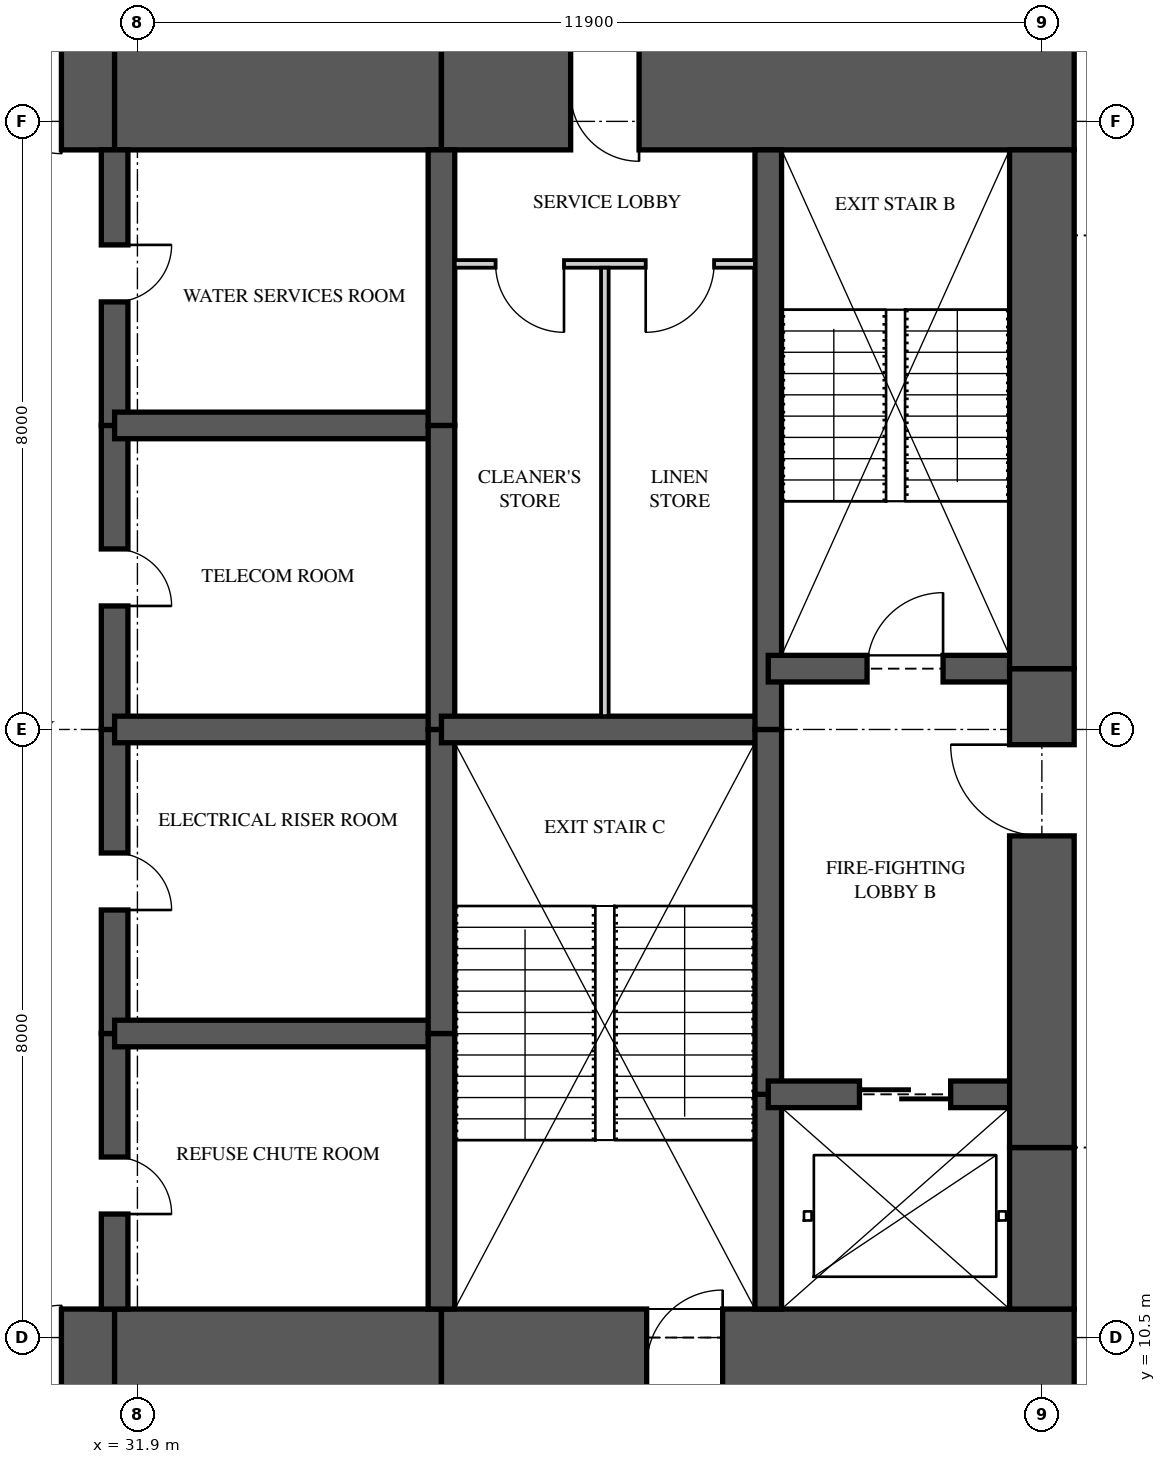
"""IFC4 building model, lengths in metres.
Left out: names, types, materials, properties, quantities, classifications, styles, units other than length and angle.
Written with IfcOpenShell. Run it as: python <this file> out.ifc"""

import sys

from ifc_helpers import new_model, si_unit, direction, frame, frame_2d, origin, place, context, subcontext, project, spatial, rectangle, extrude, element, fill, save


model = new_model("IFC4")
c1 = context("Model", 3, precision=1e-05, world=origin(), true_north=direction((0.0, 1.0)))
c2 = subcontext(c1, "Body", "Model", "MODEL_VIEW")
j1 = project(units=[si_unit("LENGTHUNIT", "METRE"), si_unit("PLANEANGLEUNIT", "RADIAN")], contexts=[c1])
p1 = place(None, origin())
s1 = spatial("IfcSite", under=j1, at=p1, CompositionType="ELEMENT")
p2 = place(p1, origin())
s2 = spatial("IfcBuilding", under=s1, at=p2, CompositionType="ELEMENT")
p3 = place(p2, frame((0.0, 0.0, 131.65)))
s3 = spatial("IfcBuildingStorey", under=s2, at=p3, CompositionType="ELEMENT", Elevation=131.65)
p4 = place(p3, frame((26.0, 10.125, 0.0), z_axis=(0.0, 0.0, 1.0), x_axis=(1.0, 0.0, 0.0)))
e1 = element("IfcWall", 1, at=p4, inside=s3, PredefinedType="SHEAR", context=c2, shape_type="SweptSolid", body=[
    extrude(rectangle(XDim=5.6, YDim=1.5, at=frame_2d((2.8, 0.0))), origin(), (0.0, 0.0, 1.0), 3.35),
])
p5 = place(p4, frame((3.3, 0.0, 0.0)))
e2 = element("IfcOpeningElement", 2, at=p5, cuts=e1, PredefinedType="OPENING", context=c2, shape_type="SweptSolid", body=[
    extrude(rectangle(XDim=1.6, YDim=2.1, at=frame_2d((0.8, 1.05))), frame((0.0, 0.76, 0.0), z_axis=(0.0, -1.0, 0.0), x_axis=(1.0, 0.0, 0.0)), (0.0, 0.0, 1.0), 1.52),
])
p6 = place(p3, frame((31.6, 10.125, 0.0), z_axis=(0.0, 0.0, 1.0), x_axis=(1.0, 0.0, 0.0)))
e3 = element("IfcWall", 3, at=p6, inside=s3, PredefinedType="SHEAR", context=c2, shape_type="SweptSolid", body=[
    extrude(rectangle(XDim=4.3, YDim=1.5, at=frame_2d((2.15, 0.0))), origin(), (0.0, 0.0, 1.0), 3.35),
])
p7 = place(p3, frame((35.9, 10.125, 0.0), z_axis=(0.0, 0.0, 1.0), x_axis=(1.0, 0.0, 0.0)))
e4 = element("IfcWall", 4, at=p7, inside=s3, PredefinedType="SHEAR", context=c2, shape_type="SweptSolid", body=[
    extrude(rectangle(XDim=8.325, YDim=1.5, at=frame_2d((4.163, 0.0))), origin(), (0.0, 0.0, 1.0), 3.35),
])
p8 = place(p7, frame((2.7, 0.0, 0.0)))
e5 = element("IfcOpeningElement", 5, at=p8, cuts=e4, PredefinedType="OPENING", context=c2, shape_type="SweptSolid", body=[
    extrude(rectangle(XDim=1.0, YDim=2.1, at=frame_2d((0.5, 1.05))), frame((0.0, 0.76, 0.0), z_axis=(0.0, -1.0, 0.0), x_axis=(1.0, 0.0, 0.0)), (0.0, 0.0, 1.0), 1.52),
])
p9 = place(p3, frame((44.225, 26.875, 0.0), z_axis=(0.0, 0.0, 1.0), x_axis=(-1.0, 0.0, 0.0)))
e6 = element("IfcWall", 6, at=p9, inside=s3, PredefinedType="SHEAR", context=c2, shape_type="SweptSolid", body=[
    extrude(rectangle(XDim=8.325, YDim=1.5, at=frame_2d((4.163, 0.0))), origin(), (0.0, 0.0, 1.0), 3.35),
])
p10 = place(p9, frame((5.725, 0.0, 0.0)))
e7 = element("IfcOpeningElement", 7, at=p10, cuts=e6, PredefinedType="OPENING", context=c2, shape_type="SweptSolid", body=[
    extrude(rectangle(XDim=0.9, YDim=2.1, at=frame_2d((0.45, 1.05))), frame((0.0, 0.76, 0.0), z_axis=(0.0, -1.0, 0.0), x_axis=(1.0, 0.0, 0.0)), (0.0, 0.0, 1.0), 1.52),
])
p11 = place(p3, frame((35.9, 26.875, 0.0), z_axis=(0.0, 0.0, 1.0), x_axis=(-1.0, 0.0, 0.0)))
e8 = element("IfcWall", 8, at=p11, inside=s3, PredefinedType="SHEAR", context=c2, shape_type="SweptSolid", body=[
    extrude(rectangle(XDim=4.3, YDim=1.5, at=frame_2d((2.15, 0.0))), origin(), (0.0, 0.0, 1.0), 3.35),
])
p12 = place(p3, frame((31.6, 26.875, 0.0), z_axis=(0.0, 0.0, 1.0), x_axis=(-1.0, 0.0, 0.0)))
e9 = element("IfcWall", 9, at=p12, inside=s3, PredefinedType="SHEAR", context=c2, shape_type="SweptSolid", body=[
    extrude(rectangle(XDim=5.6, YDim=1.5, at=frame_2d((2.8, 0.0))), origin(), (0.0, 0.0, 1.0), 3.35),
])
p13 = place(p12, frame((0.7, 0.0, 0.0)))
e10 = element("IfcOpeningElement", 10, at=p13, cuts=e9, PredefinedType="OPENING", context=c2, shape_type="SweptSolid", body=[
    extrude(rectangle(XDim=1.6, YDim=2.1, at=frame_2d((0.8, 1.05))), frame((0.0, 0.76, 0.0), z_axis=(0.0, -1.0, 0.0), x_axis=(1.0, 0.0, 0.0)), (0.0, 0.0, 1.0), 1.52),
])
p14 = place(p3, frame((43.8, 10.875, 0.0), z_axis=(0.0, 0.0, 1.0), x_axis=(0.0, 1.0, 0.0)))
e11 = element("IfcWall", 11, at=p14, inside=s3, PredefinedType="SHEAR", context=c2, shape_type="SweptSolid", body=[
    extrude(rectangle(XDim=2.125, YDim=0.85, at=frame_2d((1.062, 0.0))), origin(), (0.0, 0.0, 1.0), 3.35),
])
p15 = place(p3, frame((43.8, 13.0, 0.0), z_axis=(0.0, 0.0, 1.0), x_axis=(0.0, 1.0, 0.0)))
e12 = element("IfcWall", 12, at=p15, inside=s3, PredefinedType="SHEAR", context=c2, shape_type="SweptSolid", body=[
    extrude(rectangle(XDim=6.3, YDim=0.85, at=frame_2d((3.15, 0.0))), origin(), (0.0, 0.0, 1.0), 3.35),
])
p16 = place(p15, frame((4.1, 0.0, 0.0)))
e13 = element("IfcOpeningElement", 13, at=p16, cuts=e12, PredefinedType="OPENING", context=c2, shape_type="SweptSolid", body=[
    extrude(rectangle(XDim=1.2, YDim=2.2, at=frame_2d((0.6, 1.1))), frame((0.0, 0.435, 0.0), z_axis=(0.0, -1.0, 0.0), x_axis=(1.0, 0.0, 0.0)), (0.0, 0.0, 1.0), 0.87),
])
p17 = place(p3, frame((43.8, 19.3, 0.0), z_axis=(0.0, 0.0, 1.0), x_axis=(0.0, 1.0, 0.0)))
e14 = element("IfcWall", 14, at=p17, inside=s3, PredefinedType="SHEAR", context=c2, shape_type="SweptSolid", body=[
    extrude(rectangle(XDim=6.825, YDim=0.85, at=frame_2d((3.413, 0.0))), origin(), (0.0, 0.0, 1.0), 3.35),
])
p18 = place(p3, frame((31.6, 10.875, 0.0), z_axis=(0.0, 0.0, 1.0), x_axis=(0.0, 1.0, 0.0)))
e15 = element("IfcWall", 15, at=p18, inside=s3, PredefinedType="SHEAR", context=c2, shape_type="SweptSolid", body=[
    extrude(rectangle(XDim=3.625, YDim=0.35, at=frame_2d((1.812, 0.0))), origin(), (0.0, 0.0, 1.0), 3.35),
])
p19 = place(p18, frame((1.25, 0.0, 0.0)))
e16 = element("IfcOpeningElement", 16, at=p19, cuts=e15, PredefinedType="OPENING", context=c2, shape_type="SweptSolid", body=[
    extrude(rectangle(XDim=0.75, YDim=2.1, at=frame_2d((0.375, 1.05))), frame((0.0, 0.185, 0.0), z_axis=(0.0, -1.0, 0.0), x_axis=(1.0, 0.0, 0.0)), (0.0, 0.0, 1.0), 0.37),
])
p20 = place(p3, frame((31.6, 14.5, 0.0), z_axis=(0.0, 0.0, 1.0), x_axis=(0.0, 1.0, 0.0)))
e17 = element("IfcWall", 17, at=p20, inside=s3, PredefinedType="SHEAR", context=c2, shape_type="SweptSolid", body=[
    extrude(rectangle(XDim=4.0, YDim=0.35, at=frame_2d((2.0, 0.0))), origin(), (0.0, 0.0, 1.0), 3.35),
])
p21 = place(p20, frame((1.625, 0.0, 0.0)))
e18 = element("IfcOpeningElement", 18, at=p21, cuts=e17, PredefinedType="OPENING", context=c2, shape_type="SweptSolid", body=[
    extrude(rectangle(XDim=0.75, YDim=2.1, at=frame_2d((0.375, 1.05))), frame((0.0, 0.185, 0.0), z_axis=(0.0, -1.0, 0.0), x_axis=(1.0, 0.0, 0.0)), (0.0, 0.0, 1.0), 0.37),
])
p22 = place(p3, frame((31.6, 18.5, 0.0), z_axis=(0.0, 0.0, 1.0), x_axis=(0.0, 1.0, 0.0)))
e19 = element("IfcWall", 19, at=p22, inside=s3, PredefinedType="SHEAR", context=c2, shape_type="SweptSolid", body=[
    extrude(rectangle(XDim=4.0, YDim=0.35, at=frame_2d((2.0, 0.0))), origin(), (0.0, 0.0, 1.0), 3.35),
])
p23 = place(p22, frame((1.625, 0.0, 0.0)))
e20 = element("IfcOpeningElement", 20, at=p23, cuts=e19, PredefinedType="OPENING", context=c2, shape_type="SweptSolid", body=[
    extrude(rectangle(XDim=0.75, YDim=2.1, at=frame_2d((0.375, 1.05))), frame((0.0, 0.185, 0.0), z_axis=(0.0, -1.0, 0.0), x_axis=(1.0, 0.0, 0.0)), (0.0, 0.0, 1.0), 0.37),
])
p24 = place(p3, frame((31.6, 22.5, 0.0), z_axis=(0.0, 0.0, 1.0), x_axis=(0.0, 1.0, 0.0)))
e21 = element("IfcWall", 21, at=p24, inside=s3, PredefinedType="SHEAR", context=c2, shape_type="SweptSolid", body=[
    extrude(rectangle(XDim=3.625, YDim=0.35, at=frame_2d((1.812, 0.0))), origin(), (0.0, 0.0, 1.0), 3.35),
])
p25 = place(p24, frame((1.625, 0.0, 0.0)))
e22 = element("IfcOpeningElement", 22, at=p25, cuts=e21, PredefinedType="OPENING", context=c2, shape_type="SweptSolid", body=[
    extrude(rectangle(XDim=0.75, YDim=2.1, at=frame_2d((0.375, 1.05))), frame((0.0, 0.185, 0.0), z_axis=(0.0, -1.0, 0.0), x_axis=(1.0, 0.0, 0.0)), (0.0, 0.0, 1.0), 0.37),
])
p26 = place(p3, frame((35.9, 10.875, 0.0), z_axis=(0.0, 0.0, 1.0), x_axis=(0.0, 1.0, 0.0)))
e23 = element("IfcWall", 23, at=p26, inside=s3, PredefinedType="SHEAR", context=c2, shape_type="SweptSolid", body=[
    extrude(rectangle(XDim=3.625, YDim=0.35, at=frame_2d((1.812, 0.0))), origin(), (0.0, 0.0, 1.0), 3.35),
])
for number, where, z_axis, x_axis in (
    (24, (35.9, 14.5, 0.0), (0.0, 0.0, 1.0), (0.0, 1.0, 0.0)),
    (25, (35.9, 18.5, 0.0), (0.0, 0.0, 1.0), (0.0, 1.0, 0.0)),
):
    element("IfcWall", number, at=place(p3, frame(where, z_axis=z_axis, x_axis=x_axis)), inside=s3, PredefinedType="SHEAR", context=c2, shape_type="SweptSolid", body=[
        extrude(rectangle(XDim=4.0, YDim=0.35, at=frame_2d((2.0, 0.0))), origin(), (0.0, 0.0, 1.0), 3.35),
    ])
p27 = place(p3, frame((35.9, 22.5, 0.0), z_axis=(0.0, 0.0, 1.0), x_axis=(0.0, 1.0, 0.0)))
e26 = element("IfcWall", 26, at=p27, inside=s3, PredefinedType="SHEAR", context=c2, shape_type="SweptSolid", body=[
    extrude(rectangle(XDim=3.625, YDim=0.35, at=frame_2d((1.812, 0.0))), origin(), (0.0, 0.0, 1.0), 3.35),
])
p28 = place(p3, frame((40.2, 10.875, 0.0), z_axis=(0.0, 0.0, 1.0), x_axis=(0.0, 1.0, 0.0)))
e27 = element("IfcWall", 27, at=p28, inside=s3, PredefinedType="SHEAR", context=c2, shape_type="SweptSolid", body=[
    extrude(rectangle(XDim=2.825, YDim=0.35, at=frame_2d((1.413, 0.0))), origin(), (0.0, 0.0, 1.0), 3.35),
])
p29 = place(p3, frame((40.2, 13.7, 0.0), z_axis=(0.0, 0.0, 1.0), x_axis=(0.0, 1.0, 0.0)))
e28 = element("IfcWall", 28, at=p29, inside=s3, PredefinedType="SHEAR", context=c2, shape_type="SweptSolid", body=[
    extrude(rectangle(XDim=4.8, YDim=0.35, at=frame_2d((2.4, 0.0))), origin(), (0.0, 0.0, 1.0), 3.35),
])
p30 = place(p3, frame((40.2, 18.5, 0.0), z_axis=(0.0, 0.0, 1.0), x_axis=(0.0, 1.0, 0.0)))
e29 = element("IfcWall", 29, at=p30, inside=s3, PredefinedType="SHEAR", context=c2, shape_type="SweptSolid", body=[
    extrude(rectangle(XDim=7.625, YDim=0.35, at=frame_2d((3.812, 0.0))), origin(), (0.0, 0.0, 1.0), 3.35),
])
for number, where, z_axis, x_axis in (
    (30, (31.6, 14.5, 0.0), (0.0, 0.0, 1.0), (1.0, 0.0, 0.0)),
    (31, (31.6, 18.5, 0.0), (0.0, 0.0, 1.0), (1.0, 0.0, 0.0)),
    (32, (31.6, 22.5, 0.0), (0.0, 0.0, 1.0), (1.0, 0.0, 0.0)),
):
    element("IfcWall", number, at=place(p3, frame(where, z_axis=z_axis, x_axis=x_axis)), inside=s3, PredefinedType="SHEAR", context=c2, shape_type="SweptSolid", body=[
        extrude(rectangle(XDim=4.3, YDim=0.35, at=frame_2d((2.15, 0.0))), origin(), (0.0, 0.0, 1.0), 3.35),
    ])
p31 = place(p3, frame((35.9, 18.5, 0.0), z_axis=(0.0, 0.0, 1.0), x_axis=(1.0, 0.0, 0.0)))
e33 = element("IfcWall", 33, at=p31, inside=s3, PredefinedType="SHEAR", context=c2, shape_type="SweptSolid", body=[
    extrude(rectangle(XDim=4.3, YDim=0.35, at=frame_2d((2.15, 0.0))), origin(), (0.0, 0.0, 1.0), 3.35),
])
p32 = place(p3, frame((40.2, 13.7, 0.0), z_axis=(0.0, 0.0, 1.0), x_axis=(1.0, 0.0, 0.0)))
e34 = element("IfcWall", 34, at=p32, inside=s3, PredefinedType="SHEAR", context=c2, shape_type="SweptSolid", body=[
    extrude(rectangle(XDim=3.6, YDim=0.35, at=frame_2d((1.8, 0.0))), origin(), (0.0, 0.0, 1.0), 3.35),
])
p33 = place(p32, frame((1.2, 0.0, 0.0)))
e35 = element("IfcOpeningElement", 35, at=p33, cuts=e34, PredefinedType="OPENING", context=c2, shape_type="SweptSolid", body=[
    extrude(rectangle(XDim=1.2, YDim=2.1, at=frame_2d((0.6, 1.05))), frame((0.0, 0.185, 0.0), z_axis=(0.0, -1.0, 0.0), x_axis=(1.0, 0.0, 0.0)), (0.0, 0.0, 1.0), 0.37),
])
p34 = place(p3, frame((40.2, 19.3, 0.0), z_axis=(0.0, 0.0, 1.0), x_axis=(1.0, 0.0, 0.0)))
e36 = element("IfcWall", 36, at=p34, inside=s3, PredefinedType="SHEAR", context=c2, shape_type="SweptSolid", body=[
    extrude(rectangle(XDim=3.6, YDim=0.35, at=frame_2d((1.8, 0.0))), origin(), (0.0, 0.0, 1.0), 3.35),
])
p35 = place(p34, frame((1.3, 0.0, 0.0)))
e37 = element("IfcOpeningElement", 37, at=p35, cuts=e36, PredefinedType="OPENING", context=c2, shape_type="SweptSolid", body=[
    extrude(rectangle(XDim=1.0, YDim=2.1, at=frame_2d((0.5, 1.05))), frame((0.0, 0.185, 0.0), z_axis=(0.0, -1.0, 0.0), x_axis=(1.0, 0.0, 0.0)), (0.0, 0.0, 1.0), 0.37),
])
p36 = place(p3, frame((36.075, 24.625, 0.0), z_axis=(0.0, 0.0, 1.0), x_axis=(1.0, 0.0, 0.0)))
e38 = element("IfcWall", 38, at=p36, inside=s3, PredefinedType="PARTITIONING", context=c2, shape_type="SweptSolid", body=[
    extrude(rectangle(XDim=3.95, YDim=0.1, at=frame_2d((1.975, 0.0))), origin(), (0.0, 0.0, 1.0), 3.11),
])
p37 = place(p36, frame((0.538, 0.0, 0.0)))
e39 = element("IfcOpeningElement", 39, at=p37, cuts=e38, PredefinedType="OPENING", context=c2, shape_type="SweptSolid", body=[
    extrude(rectangle(XDim=0.9, YDim=2.1, at=frame_2d((0.45, 1.05))), frame((0.0, 0.06, 0.0), z_axis=(0.0, -1.0, 0.0), x_axis=(1.0, 0.0, 0.0)), (0.0, 0.0, 1.0), 0.12),
])
p38 = place(p36, frame((2.512, 0.0, 0.0)))
e40 = element("IfcOpeningElement", 40, at=p38, cuts=e38, PredefinedType="OPENING", context=c2, shape_type="SweptSolid", body=[
    extrude(rectangle(XDim=0.9, YDim=2.1, at=frame_2d((0.45, 1.05))), frame((0.0, 0.06, 0.0), z_axis=(0.0, -1.0, 0.0), x_axis=(1.0, 0.0, 0.0)), (0.0, 0.0, 1.0), 0.12),
])
p39 = place(p3, frame((38.05, 18.675, 0.0), z_axis=(0.0, 0.0, 1.0), x_axis=(0.0, 1.0, 0.0)))
e41 = element("IfcWall", 41, at=p39, inside=s3, PredefinedType="PARTITIONING", context=c2, shape_type="SweptSolid", body=[
    extrude(rectangle(XDim=5.9, YDim=0.1, at=frame_2d((2.95, 0.0))), origin(), (0.0, 0.0, 1.0), 3.11),
])
p40 = place(p37, frame((0.9, 0.0, 0.0), z_axis=(0.0, 0.0, 1.0), x_axis=(-1.0, 0.0, 0.0)))
e42 = element("IfcDoor", 42, at=p40, inside=s3, OperationType="SINGLE_SWING_LEFT", PredefinedType="DOOR", context=c2, shape_type="SweptSolid", body=[
    extrude(rectangle(XDim=0.9, YDim=2.1, at=frame_2d((0.45, 1.05))), frame((0.0, 0.025, 0.0), z_axis=(0.0, -1.0, 0.0), x_axis=(1.0, 0.0, 0.0)), (0.0, 0.0, 1.0), 0.05),
])
fill(e39, e42)
p41 = place(p38, frame((0.9, 0.0, 0.0), z_axis=(0.0, 0.0, 1.0), x_axis=(-1.0, 0.0, 0.0)))
e43 = element("IfcDoor", 43, at=p41, inside=s3, OperationType="SINGLE_SWING_RIGHT", PredefinedType="DOOR", context=c2, shape_type="SweptSolid", body=[
    extrude(rectangle(XDim=0.9, YDim=2.1, at=frame_2d((0.45, 1.05))), frame((0.0, 0.025, 0.0), z_axis=(0.0, -1.0, 0.0), x_axis=(1.0, 0.0, 0.0)), (0.0, 0.0, 1.0), 0.05),
])
fill(e40, e43)
p42 = place(p35, origin())
e44 = element("IfcDoor", 44, at=p42, inside=s3, OperationType="SINGLE_SWING_RIGHT", PredefinedType="DOOR", context=c2, shape_type="SweptSolid", body=[
    extrude(rectangle(XDim=1.0, YDim=2.1, at=frame_2d((0.5, 1.05))), frame((0.0, 0.025, 0.0), z_axis=(0.0, -1.0, 0.0), x_axis=(1.0, 0.0, 0.0)), (0.0, 0.0, 1.0), 0.05),
])
fill(e37, e44)
p43 = place(p16, origin())
e45 = element("IfcDoor", 45, at=p43, inside=s3, OperationType="SINGLE_SWING_RIGHT", PredefinedType="DOOR", context=c2, shape_type="SweptSolid", body=[
    extrude(rectangle(XDim=1.2, YDim=2.2, at=frame_2d((0.6, 1.1))), frame((0.0, 0.025, 0.0), z_axis=(0.0, -1.0, 0.0), x_axis=(1.0, 0.0, 0.0)), (0.0, 0.0, 1.0), 0.05),
])
fill(e13, e45)
p44 = place(p33, origin())
e46 = element("IfcDoor", 46, at=p44, inside=s3, OperationType="SLIDING_TO_LEFT", PredefinedType="DOOR", context=c2, shape_type="SweptSolid", body=[
    extrude(rectangle(XDim=1.2, YDim=2.1, at=frame_2d((0.6, 1.05))), frame((0.0, 0.025, 0.0), z_axis=(0.0, -1.0, 0.0), x_axis=(1.0, 0.0, 0.0)), (0.0, 0.0, 1.0), 0.05),
])
fill(e35, e46)
p45 = place(p5, origin())
e47 = element("IfcDoor", 47, at=p45, inside=s3, OperationType="DOUBLE_DOOR_SINGLE_SWING", PredefinedType="DOOR", context=c2, shape_type="SweptSolid", body=[
    extrude(rectangle(XDim=1.6, YDim=2.1, at=frame_2d((0.8, 1.05))), frame((0.0, 0.025, 0.0), z_axis=(0.0, -1.0, 0.0), x_axis=(1.0, 0.0, 0.0)), (0.0, 0.0, 1.0), 0.05),
])
fill(e2, e47)
p46 = place(p13, origin())
e48 = element("IfcDoor", 48, at=p46, inside=s3, OperationType="DOUBLE_DOOR_SINGLE_SWING", PredefinedType="DOOR", context=c2, shape_type="SweptSolid", body=[
    extrude(rectangle(XDim=1.6, YDim=2.1, at=frame_2d((0.8, 1.05))), frame((0.0, 0.025, 0.0), z_axis=(0.0, -1.0, 0.0), x_axis=(1.0, 0.0, 0.0)), (0.0, 0.0, 1.0), 0.05),
])
fill(e10, e48)
p47 = place(p19, frame((0.75, 0.0, 0.0), z_axis=(0.0, 0.0, 1.0), x_axis=(-1.0, 0.0, 0.0)))
e49 = element("IfcDoor", 49, at=p47, inside=s3, OperationType="SINGLE_SWING_RIGHT", PredefinedType="DOOR", context=c2, shape_type="SweptSolid", body=[
    extrude(rectangle(XDim=0.75, YDim=2.1, at=frame_2d((0.375, 1.05))), frame((0.0, 0.025, 0.0), z_axis=(0.0, -1.0, 0.0), x_axis=(1.0, 0.0, 0.0)), (0.0, 0.0, 1.0), 0.05),
])
fill(e16, e49)
p48 = place(p21, frame((0.75, 0.0, 0.0), z_axis=(0.0, 0.0, 1.0), x_axis=(-1.0, 0.0, 0.0)))
e50 = element("IfcDoor", 50, at=p48, inside=s3, OperationType="SINGLE_SWING_RIGHT", PredefinedType="DOOR", context=c2, shape_type="SweptSolid", body=[
    extrude(rectangle(XDim=0.75, YDim=2.1, at=frame_2d((0.375, 1.05))), frame((0.0, 0.025, 0.0), z_axis=(0.0, -1.0, 0.0), x_axis=(1.0, 0.0, 0.0)), (0.0, 0.0, 1.0), 0.05),
])
fill(e18, e50)
p49 = place(p23, frame((0.75, 0.0, 0.0), z_axis=(0.0, 0.0, 1.0), x_axis=(-1.0, 0.0, 0.0)))
e51 = element("IfcDoor", 51, at=p49, inside=s3, OperationType="SINGLE_SWING_RIGHT", PredefinedType="DOOR", context=c2, shape_type="SweptSolid", body=[
    extrude(rectangle(XDim=0.75, YDim=2.1, at=frame_2d((0.375, 1.05))), frame((0.0, 0.025, 0.0), z_axis=(0.0, -1.0, 0.0), x_axis=(1.0, 0.0, 0.0)), (0.0, 0.0, 1.0), 0.05),
])
fill(e20, e51)
p50 = place(p25, frame((0.75, 0.0, 0.0), z_axis=(0.0, 0.0, 1.0), x_axis=(-1.0, 0.0, 0.0)))
e52 = element("IfcDoor", 52, at=p50, inside=s3, OperationType="SINGLE_SWING_LEFT", PredefinedType="DOOR", context=c2, shape_type="SweptSolid", body=[
    extrude(rectangle(XDim=0.75, YDim=2.1, at=frame_2d((0.375, 1.05))), frame((0.0, 0.025, 0.0), z_axis=(0.0, -1.0, 0.0), x_axis=(1.0, 0.0, 0.0)), (0.0, 0.0, 1.0), 0.05),
])
fill(e22, e52)
p51 = place(p8, origin())
e53 = element("IfcDoor", 53, at=p51, inside=s3, OperationType="SINGLE_SWING_RIGHT", PredefinedType="DOOR", context=c2, shape_type="SweptSolid", body=[
    extrude(rectangle(XDim=1.0, YDim=2.1, at=frame_2d((0.5, 1.05))), frame((0.0, 0.025, 0.0), z_axis=(0.0, -1.0, 0.0), x_axis=(1.0, 0.0, 0.0)), (0.0, 0.0, 1.0), 0.05),
])
fill(e5, e53)
p52 = place(p10, origin())
e54 = element("IfcDoor", 54, at=p52, inside=s3, OperationType="SINGLE_SWING_LEFT", PredefinedType="DOOR", context=c2, shape_type="SweptSolid", body=[
    extrude(rectangle(XDim=0.9, YDim=2.1, at=frame_2d((0.45, 1.05))), frame((0.0, 0.47, 0.0), z_axis=(0.0, -1.0, 0.0), x_axis=(1.0, 0.0, 0.0)), (0.0, 0.0, 1.0), 0.8),
])
fill(e7, e54)
save(model, sys.argv[1])
